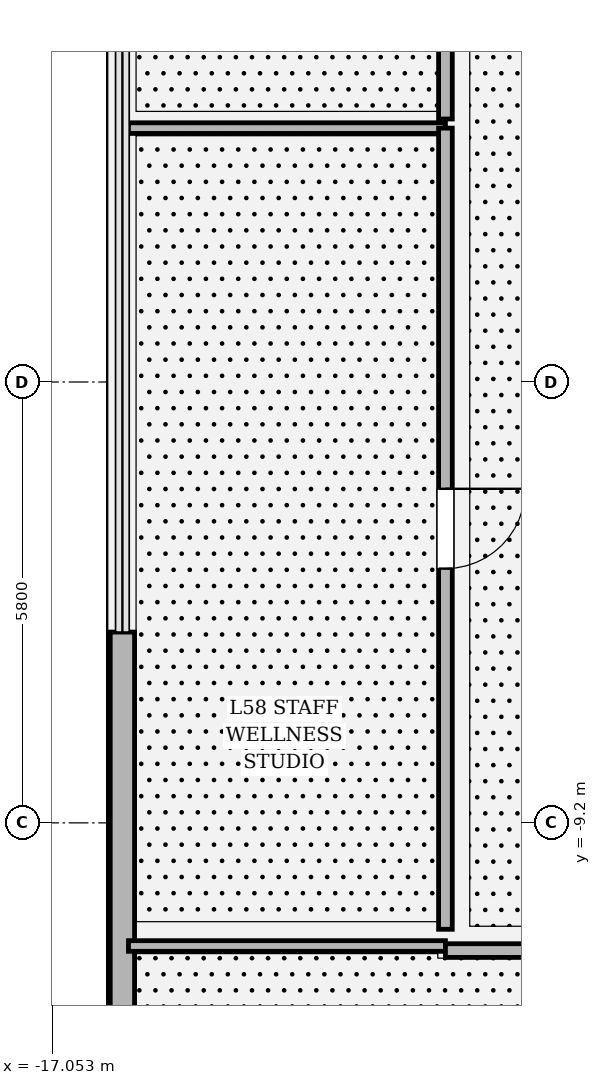
"""IFC4 building model, lengths in metres.
Left out: names, types, materials, properties, quantities, classifications, styles, units other than length and angle.
Written with IfcOpenShell. Run it as: python <this file> out.ifc"""

import sys

from ifc_helpers import new_model, si_unit, direction, frame, frame_2d, origin, place, context, subcontext, project, spatial, rectangle, extrude, element, fill, save


model = new_model("IFC4")
c1 = context("Model", 3, precision=1e-05, world=origin(), true_north=direction((0.0, 1.0)))
c2 = subcontext(c1, "Body", "Model", "MODEL_VIEW")
j1 = project(units=[si_unit("LENGTHUNIT", "METRE"), si_unit("PLANEANGLEUNIT", "RADIAN")], contexts=[c1])
p1 = place(None, origin())
s1 = spatial("IfcSite", under=j1, at=p1, CompositionType="ELEMENT")
p2 = place(p1, origin())
s2 = spatial("IfcBuilding", under=s1, at=p2, CompositionType="ELEMENT")
p3 = place(p2, frame((0.0, 0.0, 246.6)))
s3 = spatial("IfcBuildingStorey", under=s2, at=p3, CompositionType="ELEMENT", Elevation=246.6)
p4 = place(p3, frame((-16.13, -6.69, 0.0), z_axis=(0.0, 0.0, 1.0), x_axis=(0.0, -1.0, 0.0)))
e1 = element("IfcWall", 1, at=p4, inside=s3, PredefinedType="SOLIDWALL", context=c2, shape_type="SweptSolid", body=[
    extrude(rectangle(XDim=7.037, YDim=0.32, at=frame_2d((3.519, 0.0))), origin(), (0.0, 0.0, 1.0), 3.194),
])
p5 = place(p3, frame((-16.05, -10.82, 0.0), z_axis=(0.0, 0.0, 1.0), x_axis=(1.0, 0.0, 0.0)))
e2 = element("IfcWall", 2, at=p5, inside=s3, PredefinedType="PARTITIONING", context=c2, shape_type="SweptSolid", body=[
    extrude(rectangle(XDim=4.17, YDim=0.14, at=frame_2d((2.085, 0.0))), origin(), (0.0, 0.0, 1.0), 4.154),
])
p6 = place(p3, frame((-11.88, -10.88, 0.0), z_axis=(0.0, 0.0, 1.0), x_axis=(1.0, 0.0, 0.0)))
e3 = element("IfcWall", 3, at=p6, inside=s3, PredefinedType="PARTITIONING", context=c2, shape_type="SweptSolid", body=[
    extrude(rectangle(XDim=13.166, YDim=0.18, at=frame_2d((6.583, 0.0))), origin(), (0.0, 0.0, 1.0), 3.194),
])
p7 = place(p6, frame((6.058, 0.0, 0.0)))
e4 = element("IfcOpeningElement", 4, at=p7, cuts=e3, PredefinedType="OPENING", context=c2, shape_type="SweptSolid", body=[
    extrude(rectangle(XDim=1.05, YDim=2.2, at=frame_2d((0.525, 1.1))), frame((0.0, 0.1, 0.0), z_axis=(0.0, -1.0, 0.0), x_axis=(1.0, 0.0, 0.0)), (0.0, 0.0, 1.0), 0.2),
])
p8 = place(p3, frame((-16.05, -0.06, 0.0), z_axis=(0.0, 0.0, 1.0), x_axis=(1.0, 0.0, 0.0)))
e5 = element("IfcWall", 5, at=p8, inside=s3, PredefinedType="PARTITIONING", context=c2, shape_type="SweptSolid", body=[
    extrude(rectangle(XDim=4.17, YDim=0.14, at=frame_2d((2.085, 0.0))), origin(), (0.0, 0.0, 1.0), 4.52),
])
p9 = place(p3, frame((-11.88, -0.06, 0.0), z_axis=(0.0, 0.0, 1.0), x_axis=(0.0, -1.0, 0.0)))
e6 = element("IfcWall", 6, at=p9, inside=s3, PredefinedType="PARTITIONING", context=c2, shape_type="SweptSolid", body=[
    extrude(rectangle(XDim=10.54, YDim=0.18, at=frame_2d((5.27, 0.0))), origin(), (0.0, 0.0, 1.0), 3.194),
])
p10 = place(p9, frame((4.745, 0.0, 0.0)))
e7 = element("IfcOpeningElement", 7, at=p10, cuts=e6, PredefinedType="OPENING", context=c2, shape_type="SweptSolid", body=[
    extrude(rectangle(XDim=1.05, YDim=2.2, at=frame_2d((0.525, 1.1))), frame((0.0, 0.1, 0.0), z_axis=(0.0, -1.0, 0.0), x_axis=(1.0, 0.0, 0.0)), (0.0, 0.0, 1.0), 0.2),
])
p11 = place(p3, frame((-11.88, 10.6, 0.0), z_axis=(0.0, 0.0, 1.0), x_axis=(0.0, -1.0, 0.0)))
e8 = element("IfcWall", 8, at=p11, inside=s3, PredefinedType="PARTITIONING", context=c2, shape_type="SweptSolid", body=[
    extrude(rectangle(XDim=10.54, YDim=0.18, at=frame_2d((5.27, 0.0))), origin(), (0.0, 0.0, 1.0), 3.194),
])
p12 = place(p11, frame((4.745, 0.0, 0.0)))
e9 = element("IfcOpeningElement", 9, at=p12, cuts=e8, PredefinedType="OPENING", context=c2, shape_type="SweptSolid", body=[
    extrude(rectangle(XDim=1.05, YDim=2.2, at=frame_2d((0.525, 1.1))), frame((0.0, 0.1, 0.0), z_axis=(0.0, -1.0, 0.0), x_axis=(1.0, 0.0, 0.0)), (0.0, 0.0, 1.0), 0.2),
])
p13 = place(p10, origin())
e10 = element("IfcDoor", 10, at=p13, inside=s3, OperationType="SINGLE_SWING_LEFT", PredefinedType="DOOR", context=c2, shape_type="SweptSolid", body=[
    extrude(rectangle(XDim=1.05, YDim=2.2, at=frame_2d((0.525, 1.1))), frame((0.0, 0.025, 0.0), z_axis=(0.0, -1.0, 0.0), x_axis=(1.0, 0.0, 0.0)), (0.0, 0.0, 1.0), 0.05),
])
fill(e7, e10)
save(model, sys.argv[1])
